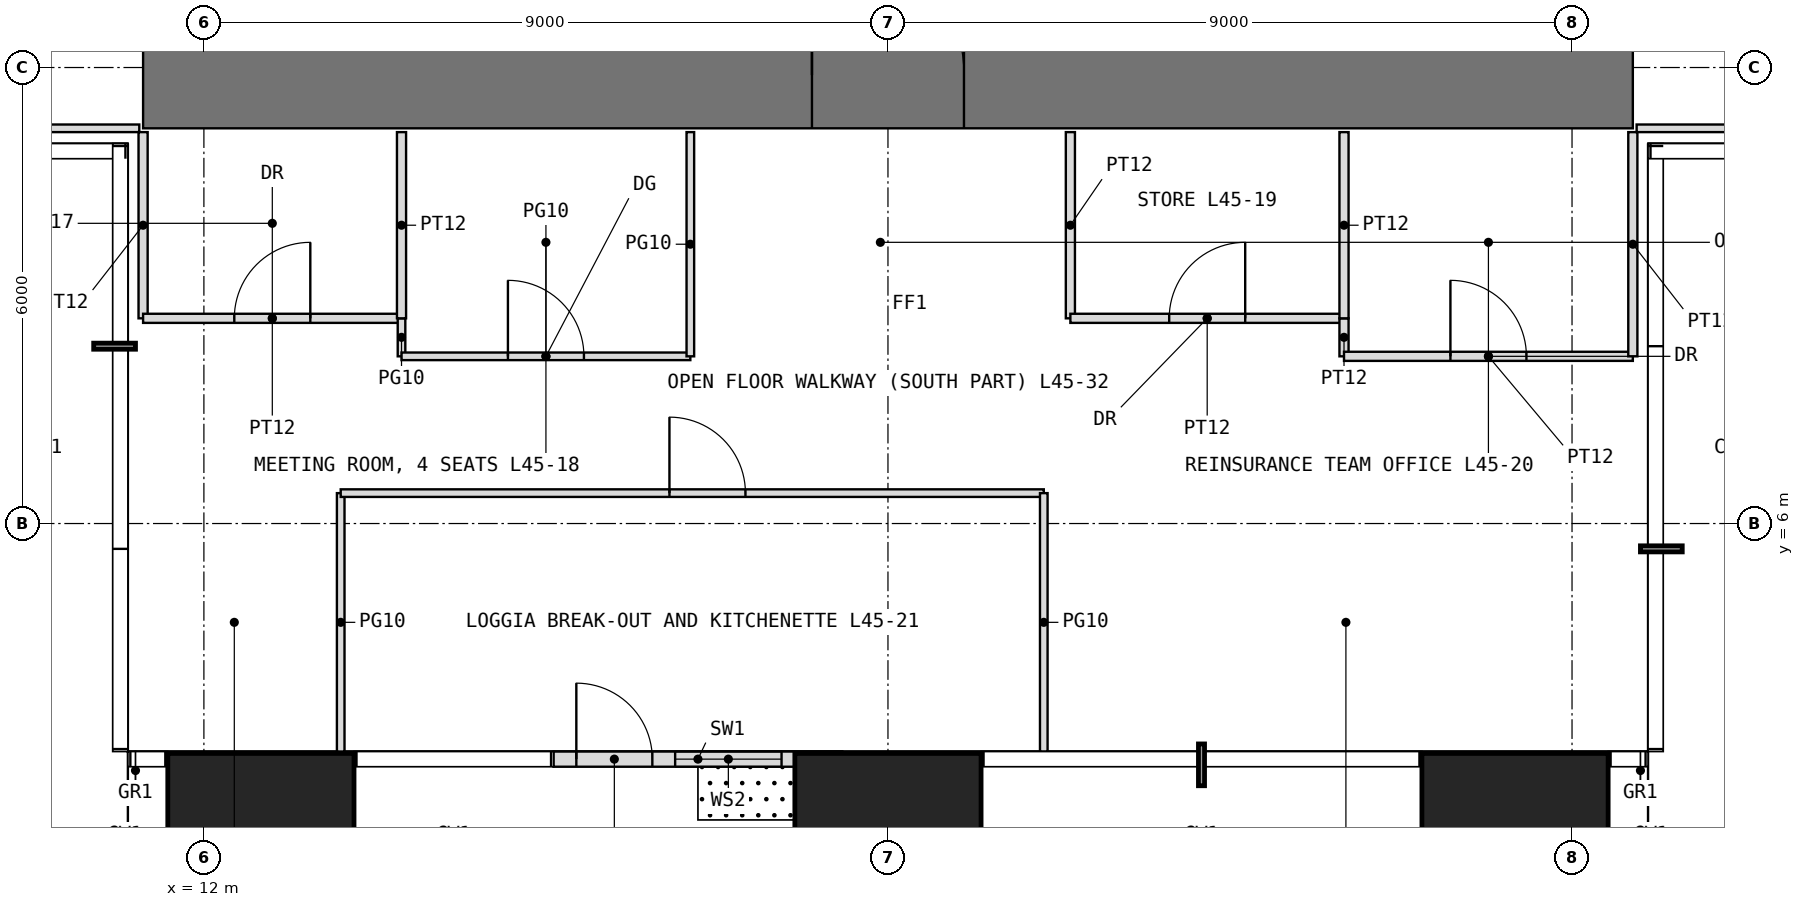
"""IFC4 building model, lengths in metres.
Left out: names, types, materials, properties, quantities, classifications, styles, units other than length and angle.
Written with IfcOpenShell. Run it as: python <this file> out.ifc"""

import sys

from ifc_helpers import new_model, si_unit, direction, frame, frame_2d, origin, origin_2d, place, context, subcontext, project, spatial, rectangle, extrude, element, fill, save


model = new_model("IFC4")
c1 = context("Model", 3, precision=1e-05, world=origin(), true_north=direction((0.0, 1.0)))
c2 = subcontext(c1, "Body", "Model", "MODEL_VIEW")
j1 = project(units=[si_unit("LENGTHUNIT", "METRE"), si_unit("PLANEANGLEUNIT", "RADIAN")], contexts=[c1])
p1 = place(None, origin())
s1 = spatial("IfcSite", under=j1, at=p1, CompositionType="ELEMENT")
p2 = place(p1, origin())
s2 = spatial("IfcBuilding", under=s1, at=p2, CompositionType="ELEMENT")
p3 = place(p2, frame((0.0, 0.0, 190.5)))
s3 = spatial("IfcBuildingStorey", under=s2, at=p3, CompositionType="ELEMENT", Elevation=190.5)
for number, where, z_axis, x_axis in (
    (1, (12.75, 1.75, 0.0), (0.0, 0.0, 1.0), (1.0, 0.0, 0.0)),
    (2, (21.0, 1.75, 0.0), (0.0, 0.0, 1.0), (1.0, 0.0, 0.0)),
    (3, (29.25, 1.75, 0.0), (0.0, 0.0, 1.0), (1.0, 0.0, 0.0)),
):
    element("IfcColumn", number, at=place(p3, frame(where, z_axis=z_axis, x_axis=x_axis)), inside=s3, PredefinedType="COLUMN", context=c2, shape_type="SweptSolid", body=[
        extrude(rectangle(XDim=2.45, YDim=2.45, at=origin_2d()), origin(), (0.0, 0.0, 1.0), 4.0),
    ])
p4 = place(p3, frame((16.6, 2.9, 0.0), z_axis=(0.0, 0.0, 1.0), x_axis=(1.0, 0.0, 0.0)))
e4 = element("IfcWall", 4, at=p4, inside=s3, PredefinedType="USERDEFINED", context=c2, shape_type="SweptSolid", body=[
    extrude(rectangle(XDim=3.8, YDim=0.2, at=frame_2d((1.9, 0.0))), origin(), (0.0, 0.0, 1.0), 3.75),
])
p5 = place(p4, frame((0.3, 0.0, 0.0)))
e5 = element("IfcOpeningElement", 5, at=p5, cuts=e4, PredefinedType="OPENING", context=c2, shape_type="SweptSolid", body=[
    extrude(rectangle(XDim=1.0, YDim=2.4, at=frame_2d((0.5, 1.2))), frame((0.0, 0.11, 0.0), z_axis=(0.0, -1.0, 0.0), x_axis=(1.0, 0.0, 0.0)), (0.0, 0.0, 1.0), 0.22),
])
p6 = place(p4, frame((1.6, 0.0, 0.3)))
e6 = element("IfcOpeningElement", 6, at=p6, cuts=e4, PredefinedType="OPENING", context=c2, shape_type="SweptSolid", body=[
    extrude(rectangle(XDim=1.4, YDim=2.7, at=frame_2d((0.7, 1.35))), frame((0.0, 0.11, 0.0), z_axis=(0.0, -1.0, 0.0), x_axis=(1.0, 0.0, 0.0)), (0.0, 0.0, 1.0), 0.22),
])
p7 = place(p3, frame((11.2, 11.9, -0.05), z_axis=(0.0, 0.0, 1.0), x_axis=(1.0, 0.0, 0.0)))
e7 = element("IfcWall", 7, at=p7, inside=s3, PredefinedType="SHEAR", context=c2, shape_type="SweptSolid", body=[
    extrude(rectangle(XDim=19.6, YDim=1.4, at=frame_2d((9.8, 0.0))), origin(), (0.0, 0.0, 1.0), 4.0),
])
p8 = place(p7, frame((8.8, 0.0, 0.05)))
e8 = element("IfcOpeningElement", 8, at=p8, cuts=e7, PredefinedType="OPENING", context=c2, shape_type="SweptSolid", body=[
    extrude(rectangle(XDim=2.0, YDim=2.2, at=frame_2d((1.0, 1.1))), frame((0.0, 0.71, 0.0), z_axis=(0.0, -1.0, 0.0), x_axis=(1.0, 0.0, 0.0)), (0.0, 0.0, 1.0), 1.42),
])
p9 = place(p3, frame((7.8, 11.2, 0.0), z_axis=(0.0, 0.0, 1.0), x_axis=(1.0, 0.0, 0.0)))
e9 = element("IfcWall", 9, at=p9, inside=s3, PredefinedType="PARTITIONING", context=c2, shape_type="SweptSolid", body=[
    extrude(rectangle(XDim=3.35, YDim=0.1, at=frame_2d((1.675, 0.0))), origin(), (0.0, 0.0, 1.0), 3.75),
])
p10 = place(p3, frame((11.2, 8.7, 0.0), z_axis=(0.0, 0.0, 1.0), x_axis=(0.0, 1.0, 0.0)))
e10 = element("IfcWall", 10, at=p10, inside=s3, PredefinedType="PARTITIONING", context=c2, shape_type="SweptSolid", body=[
    extrude(rectangle(XDim=2.45, YDim=0.12, at=frame_2d((1.225, 0.0))), origin(), (0.0, 0.0, 1.0), 3.75),
])
p11 = place(p3, frame((11.2, 8.7, 0.0), z_axis=(0.0, 0.0, 1.0), x_axis=(1.0, 0.0, 0.0)))
e11 = element("IfcWall", 11, at=p11, inside=s3, PredefinedType="PARTITIONING", context=c2, shape_type="SweptSolid", body=[
    extrude(rectangle(XDim=3.4, YDim=0.12, at=frame_2d((1.7, 0.0))), origin(), (0.0, 0.0, 1.0), 3.75),
])
p12 = place(p11, frame((1.2, 0.0, 0.0)))
e12 = element("IfcOpeningElement", 12, at=p12, cuts=e11, PredefinedType="OPENING", context=c2, shape_type="SweptSolid", body=[
    extrude(rectangle(XDim=1.0, YDim=2.2, at=frame_2d((0.5, 1.1))), frame((0.0, 0.07, 0.0), z_axis=(0.0, -1.0, 0.0), x_axis=(1.0, 0.0, 0.0)), (0.0, 0.0, 1.0), 0.14),
])
p13 = place(p3, frame((13.8, 3.0, 0.0), z_axis=(0.0, 0.0, 1.0), x_axis=(0.0, 1.0, 0.0)))
e13 = element("IfcWall", 13, at=p13, inside=s3, PredefinedType="PARTITIONING", context=c2, shape_type="SweptSolid", body=[
    extrude(rectangle(XDim=3.4, YDim=0.1, at=frame_2d((1.7, 0.0))), origin(), (0.0, 0.0, 1.0), 3.75),
])
p14 = place(p3, frame((13.8, 6.4, 0.0), z_axis=(0.0, 0.0, 1.0), x_axis=(1.0, 0.0, 0.0)))
e14 = element("IfcWall", 14, at=p14, inside=s3, PredefinedType="PARTITIONING", context=c2, shape_type="SweptSolid", body=[
    extrude(rectangle(XDim=9.25, YDim=0.1, at=frame_2d((4.625, 0.0))), origin(), (0.0, 0.0, 1.0), 3.75),
])
p15 = place(p14, frame((4.325, 0.0, 0.0)))
e15 = element("IfcOpeningElement", 15, at=p15, cuts=e14, PredefinedType="OPENING", context=c2, shape_type="SweptSolid", body=[
    extrude(rectangle(XDim=1.0, YDim=2.4, at=frame_2d((0.5, 1.2))), frame((0.0, 0.06, 0.0), z_axis=(0.0, -1.0, 0.0), x_axis=(1.0, 0.0, 0.0)), (0.0, 0.0, 1.0), 0.12),
])
p16 = place(p3, frame((14.6, 8.2, 0.0), z_axis=(0.0, 0.0, 1.0), x_axis=(0.0, 1.0, 0.0)))
e16 = element("IfcWall", 16, at=p16, inside=s3, PredefinedType="PARTITIONING", context=c2, shape_type="SweptSolid", body=[
    extrude(rectangle(XDim=0.5, YDim=0.1, at=frame_2d((0.25, 0.0))), origin(), (0.0, 0.0, 1.0), 3.75),
])
p17 = place(p3, frame((14.6, 8.2, 0.0), z_axis=(0.0, 0.0, 1.0), x_axis=(1.0, 0.0, 0.0)))
e17 = element("IfcWall", 17, at=p17, inside=s3, PredefinedType="PARTITIONING", context=c2, shape_type="SweptSolid", body=[
    extrude(rectangle(XDim=3.8, YDim=0.1, at=frame_2d((1.9, 0.0))), origin(), (0.0, 0.0, 1.0), 3.75),
])
p18 = place(p17, frame((1.4, 0.0, 0.0)))
e18 = element("IfcOpeningElement", 18, at=p18, cuts=e17, PredefinedType="OPENING", context=c2, shape_type="SweptSolid", body=[
    extrude(rectangle(XDim=1.0, YDim=2.4, at=frame_2d((0.5, 1.2))), frame((0.0, 0.06, 0.0), z_axis=(0.0, -1.0, 0.0), x_axis=(1.0, 0.0, 0.0)), (0.0, 0.0, 1.0), 0.12),
])
p19 = place(p3, frame((14.6, 8.7, 0.0), z_axis=(0.0, 0.0, 1.0), x_axis=(0.0, 1.0, 0.0)))
e19 = element("IfcWall", 19, at=p19, inside=s3, PredefinedType="PARTITIONING", context=c2, shape_type="SweptSolid", body=[
    extrude(rectangle(XDim=2.45, YDim=0.12, at=frame_2d((1.225, 0.0))), origin(), (0.0, 0.0, 1.0), 3.75),
])
p20 = place(p3, frame((18.4, 8.2, 0.0), z_axis=(0.0, 0.0, 1.0), x_axis=(0.0, 1.0, 0.0)))
e20 = element("IfcWall", 20, at=p20, inside=s3, PredefinedType="PARTITIONING", context=c2, shape_type="SweptSolid", body=[
    extrude(rectangle(XDim=2.95, YDim=0.1, at=frame_2d((1.475, 0.0))), origin(), (0.0, 0.0, 1.0), 3.75),
])
p21 = place(p3, frame((23.05, 3.0, 0.0), z_axis=(0.0, 0.0, 1.0), x_axis=(0.0, 1.0, 0.0)))
e21 = element("IfcWall", 21, at=p21, inside=s3, PredefinedType="PARTITIONING", context=c2, shape_type="SweptSolid", body=[
    extrude(rectangle(XDim=3.4, YDim=0.1, at=frame_2d((1.7, 0.0))), origin(), (0.0, 0.0, 1.0), 3.75),
])
p22 = place(p3, frame((23.4, 8.7, 0.0), z_axis=(0.0, 0.0, 1.0), x_axis=(0.0, 1.0, 0.0)))
e22 = element("IfcWall", 22, at=p22, inside=s3, PredefinedType="PARTITIONING", context=c2, shape_type="SweptSolid", body=[
    extrude(rectangle(XDim=2.45, YDim=0.12, at=frame_2d((1.225, 0.0))), origin(), (0.0, 0.0, 1.0), 3.75),
])
p23 = place(p3, frame((23.4, 8.7, 0.0), z_axis=(0.0, 0.0, 1.0), x_axis=(1.0, 0.0, 0.0)))
e23 = element("IfcWall", 23, at=p23, inside=s3, PredefinedType="PARTITIONING", context=c2, shape_type="SweptSolid", body=[
    extrude(rectangle(XDim=3.6, YDim=0.12, at=frame_2d((1.8, 0.0))), origin(), (0.0, 0.0, 1.0), 3.75),
])
p24 = place(p23, frame((1.3, 0.0, 0.0)))
e24 = element("IfcOpeningElement", 24, at=p24, cuts=e23, PredefinedType="OPENING", context=c2, shape_type="SweptSolid", body=[
    extrude(rectangle(XDim=1.0, YDim=2.2, at=frame_2d((0.5, 1.1))), frame((0.0, 0.07, 0.0), z_axis=(0.0, -1.0, 0.0), x_axis=(1.0, 0.0, 0.0)), (0.0, 0.0, 1.0), 0.14),
])
p25 = place(p3, frame((27.0, 8.2, 0.0), z_axis=(0.0, 0.0, 1.0), x_axis=(0.0, 1.0, 0.0)))
e25 = element("IfcWall", 25, at=p25, inside=s3, PredefinedType="PARTITIONING", context=c2, shape_type="SweptSolid", body=[
    extrude(rectangle(XDim=0.5, YDim=0.12, at=frame_2d((0.25, 0.0))), origin(), (0.0, 0.0, 1.0), 3.75),
])
p26 = place(p3, frame((27.0, 8.2, 0.0), z_axis=(0.0, 0.0, 1.0), x_axis=(1.0, 0.0, 0.0)))
e26 = element("IfcWall", 26, at=p26, inside=s3, PredefinedType="PARTITIONING", context=c2, shape_type="SweptSolid", body=[
    extrude(rectangle(XDim=3.8, YDim=0.12, at=frame_2d((1.9, 0.0))), origin(), (0.0, 0.0, 1.0), 3.75),
])
p27 = place(p26, frame((1.4, 0.0, 0.0)))
e27 = element("IfcOpeningElement", 27, at=p27, cuts=e26, PredefinedType="OPENING", context=c2, shape_type="SweptSolid", body=[
    extrude(rectangle(XDim=1.0, YDim=2.2, at=frame_2d((0.5, 1.1))), frame((0.0, 0.07, 0.0), z_axis=(0.0, -1.0, 0.0), x_axis=(1.0, 0.0, 0.0)), (0.0, 0.0, 1.0), 0.14),
])
p28 = place(p3, frame((27.0, 8.7, 0.0), z_axis=(0.0, 0.0, 1.0), x_axis=(0.0, 1.0, 0.0)))
e28 = element("IfcWall", 28, at=p28, inside=s3, PredefinedType="PARTITIONING", context=c2, shape_type="SweptSolid", body=[
    extrude(rectangle(XDim=2.45, YDim=0.12, at=frame_2d((1.225, 0.0))), origin(), (0.0, 0.0, 1.0), 3.75),
])
p29 = place(p3, frame((30.8, 8.2, 0.0), z_axis=(0.0, 0.0, 1.0), x_axis=(0.0, 1.0, 0.0)))
e29 = element("IfcWall", 29, at=p29, inside=s3, PredefinedType="PARTITIONING", context=c2, shape_type="SweptSolid", body=[
    extrude(rectangle(XDim=2.95, YDim=0.12, at=frame_2d((1.475, 0.0))), origin(), (0.0, 0.0, 1.0), 3.75),
])
p30 = place(p3, frame((30.85, 11.2, 0.0), z_axis=(0.0, 0.0, 1.0), x_axis=(1.0, 0.0, 0.0)))
e30 = element("IfcWall", 30, at=p30, inside=s3, PredefinedType="PARTITIONING", context=c2, shape_type="SweptSolid", body=[
    extrude(rectangle(XDim=4.75, YDim=0.1, at=frame_2d((2.375, 0.0))), origin(), (0.0, 0.0, 1.0), 3.75),
])
p31 = place(p5, origin())
e31 = element("IfcDoor", 31, at=p31, inside=s3, OperationType="SINGLE_SWING_LEFT", PredefinedType="DOOR", context=c2, shape_type="SweptSolid", body=[
    extrude(rectangle(XDim=1.0, YDim=2.4, at=frame_2d((0.5, 1.2))), frame((0.0, 0.025, 0.0), z_axis=(0.0, -1.0, 0.0), x_axis=(1.0, 0.0, 0.0)), (0.0, 0.0, 1.0), 0.05),
])
fill(e5, e31)
p32 = place(p6, origin())
e32 = element("IfcWindow", 32, at=p32, inside=s3, PartitioningType="SINGLE_PANEL", PredefinedType="WINDOW", context=c2, shape_type="SweptSolid", body=[
    extrude(rectangle(XDim=1.4, YDim=2.7, at=frame_2d((0.7, 1.35))), frame((0.0, 0.03, 0.0), z_axis=(0.0, -1.0, 0.0), x_axis=(1.0, 0.0, 0.0)), (0.0, 0.0, 1.0), 0.06),
])
fill(e6, e32)
p33 = place(p8, origin())
e33 = element("IfcDoor", 33, at=p33, inside=s3, OperationType="DOUBLE_DOOR_SINGLE_SWING", PredefinedType="DOOR", context=c2, shape_type="SweptSolid", body=[
    extrude(rectangle(XDim=2.0, YDim=2.2, at=frame_2d((1.0, 1.1))), frame((0.0, 0.025, 0.0), z_axis=(0.0, -1.0, 0.0), x_axis=(1.0, 0.0, 0.0)), (0.0, 0.0, 1.0), 0.05),
])
fill(e8, e33)
p34 = place(p12, origin())
e34 = element("IfcDoor", 34, at=p34, inside=s3, OperationType="SINGLE_SWING_RIGHT", PredefinedType="DOOR", context=c2, shape_type="SweptSolid", body=[
    extrude(rectangle(XDim=1.0, YDim=2.2, at=frame_2d((0.5, 1.1))), frame((0.0, 0.025, 0.0), z_axis=(0.0, -1.0, 0.0), x_axis=(1.0, 0.0, 0.0)), (0.0, 0.0, 1.0), 0.05),
])
fill(e12, e34)
p35 = place(p18, origin())
e35 = element("IfcDoor", 35, at=p35, inside=s3, OperationType="SINGLE_SWING_LEFT", PredefinedType="DOOR", context=c2, shape_type="SweptSolid", body=[
    extrude(rectangle(XDim=1.0, YDim=2.4, at=frame_2d((0.5, 1.2))), frame((0.0, 0.025, 0.0), z_axis=(0.0, -1.0, 0.0), x_axis=(1.0, 0.0, 0.0)), (0.0, 0.0, 1.0), 0.05),
])
fill(e18, e35)
p36 = place(p24, origin())
e36 = element("IfcDoor", 36, at=p36, inside=s3, OperationType="SINGLE_SWING_RIGHT", PredefinedType="DOOR", context=c2, shape_type="SweptSolid", body=[
    extrude(rectangle(XDim=1.0, YDim=2.2, at=frame_2d((0.5, 1.1))), frame((0.0, 0.025, 0.0), z_axis=(0.0, -1.0, 0.0), x_axis=(1.0, 0.0, 0.0)), (0.0, 0.0, 1.0), 0.05),
])
fill(e24, e36)
p37 = place(p27, origin())
e37 = element("IfcDoor", 37, at=p37, inside=s3, OperationType="SINGLE_SWING_LEFT", PredefinedType="DOOR", context=c2, shape_type="SweptSolid", body=[
    extrude(rectangle(XDim=1.0, YDim=2.2, at=frame_2d((0.5, 1.1))), frame((0.0, 0.025, 0.0), z_axis=(0.0, -1.0, 0.0), x_axis=(1.0, 0.0, 0.0)), (0.0, 0.0, 1.0), 0.05),
])
fill(e27, e37)
p38 = place(p15, origin())
e38 = element("IfcDoor", 38, at=p38, inside=s3, OperationType="SINGLE_SWING_LEFT", PredefinedType="DOOR", context=c2, shape_type="SweptSolid", body=[
    extrude(rectangle(XDim=1.0, YDim=2.4, at=frame_2d((0.5, 1.2))), frame((0.0, 0.025, 0.0), z_axis=(0.0, -1.0, 0.0), x_axis=(1.0, 0.0, 0.0)), (0.0, 0.0, 1.0), 0.05),
])
fill(e15, e38)
save(model, sys.argv[1])
